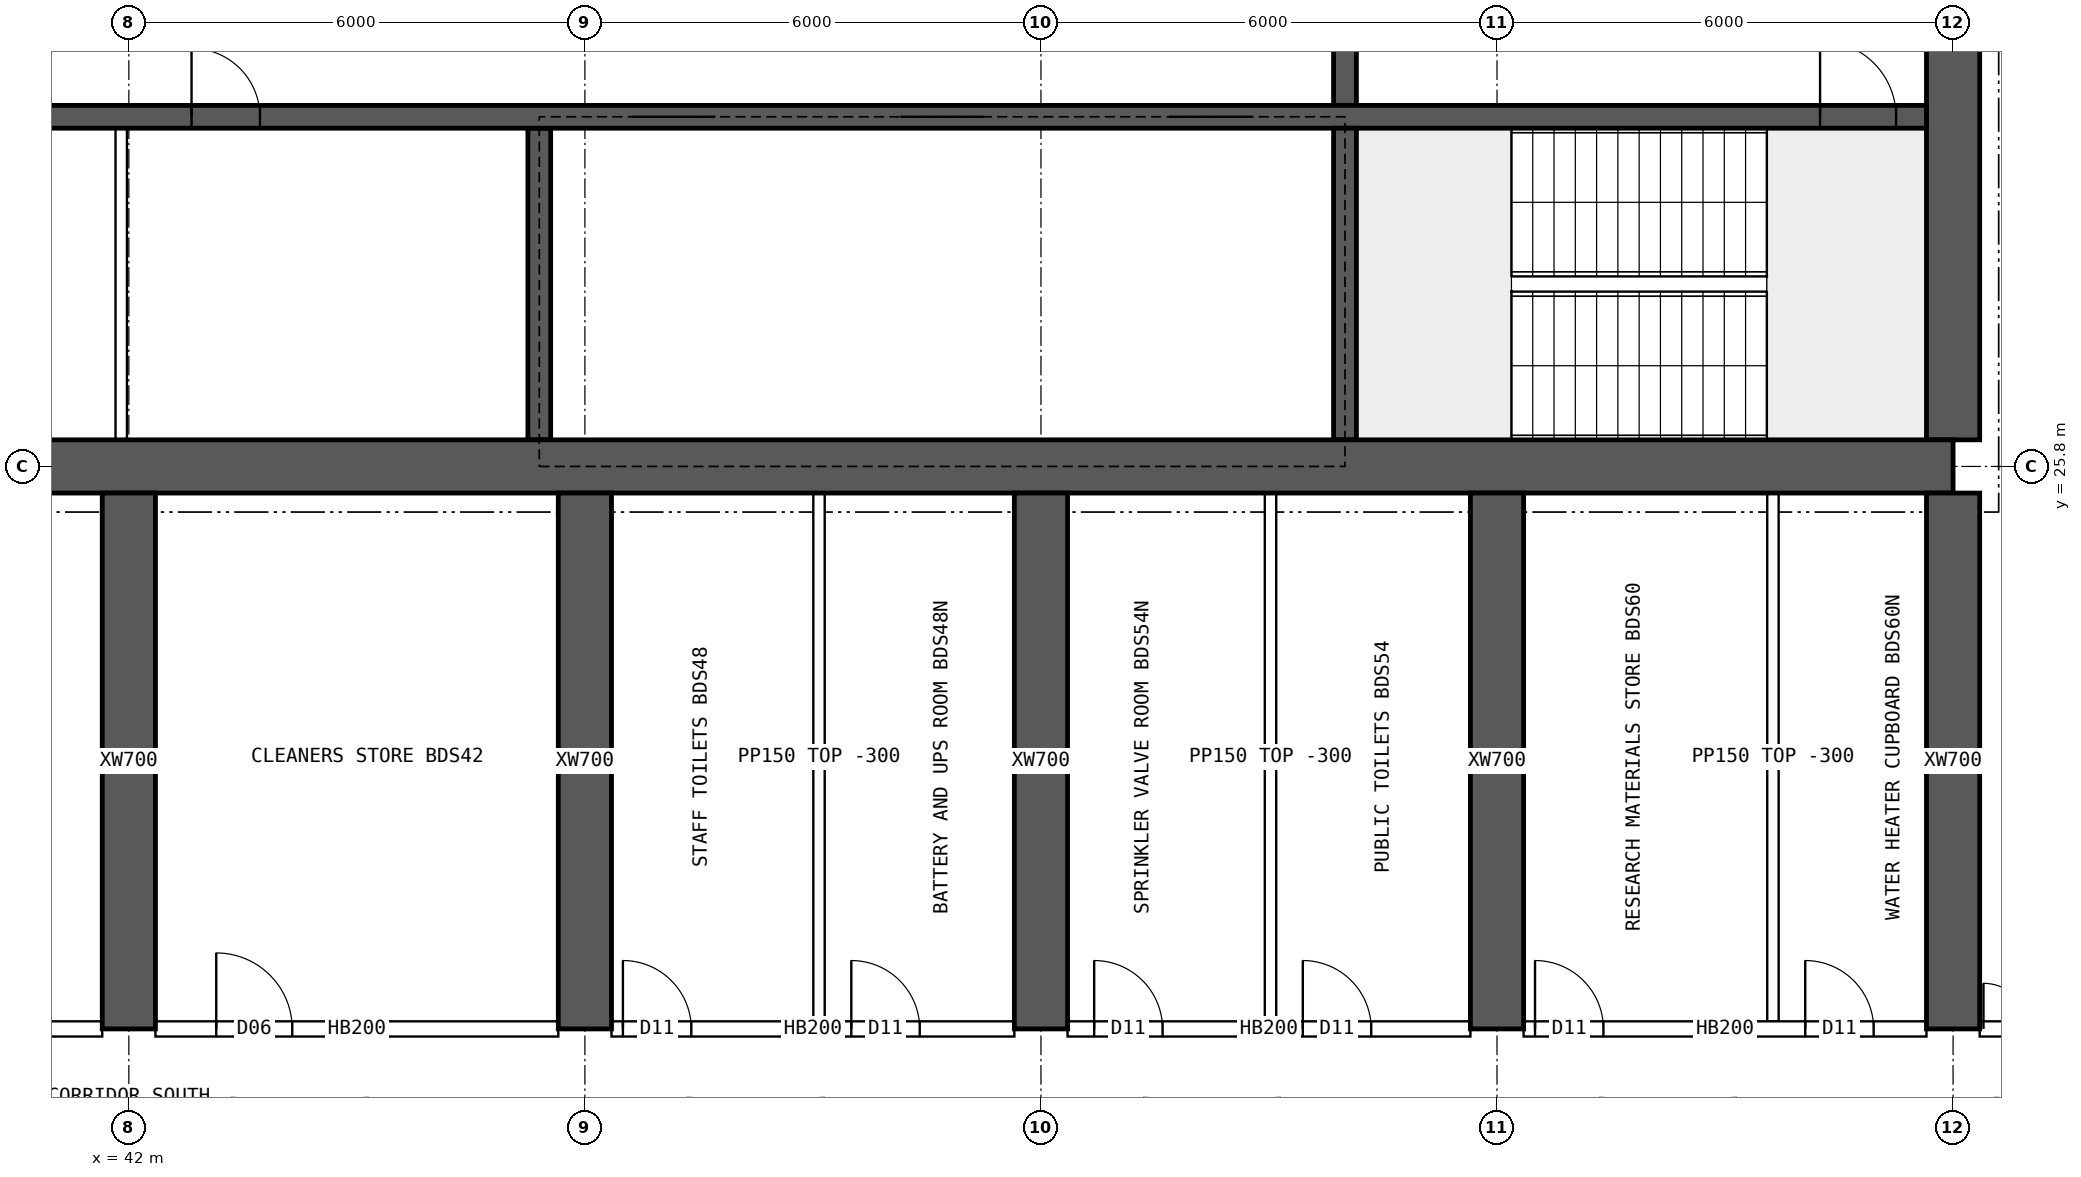
"""IFC4 building model, lengths in metres.
Left out: names, types, materials, properties, quantities, classifications, styles, units other than length and angle.
Written with IfcOpenShell. Run it as: python <this file> out.ifc"""

import sys

from ifc_helpers import new_model, si_unit, direction, frame, frame_2d, origin, place, context, subcontext, project, spatial, rectangle, extrude, element, fill, save


model = new_model("IFC4")
c1 = context("Model", 3, precision=1e-05, world=origin(), true_north=direction((0.0, 1.0)))
c2 = subcontext(c1, "Body", "Model", "MODEL_VIEW")
j1 = project(units=[si_unit("LENGTHUNIT", "METRE"), si_unit("PLANEANGLEUNIT", "RADIAN")], contexts=[c1])
p1 = place(None, origin())
s1 = spatial("IfcSite", under=j1, at=p1, CompositionType="ELEMENT")
p2 = place(p1, origin())
s2 = spatial("IfcBuilding", under=s1, at=p2, CompositionType="ELEMENT")
p3 = place(p2, frame((0.0, 0.0, 257.8)))
s3 = spatial("IfcBuildingStorey", under=s2, at=p3, CompositionType="ELEMENT", Elevation=257.8)
p4 = place(p3, frame((18.0, 25.8, 0.0), z_axis=(0.0, 0.0, 1.0), x_axis=(1.0, 0.0, 0.0)))
e1 = element("IfcWall", 1, at=p4, inside=s3, PredefinedType="SHEAR", context=c2, shape_type="SweptSolid", body=[
    extrude(rectangle(XDim=48.0, YDim=0.7, at=frame_2d((24.0, 0.0))), origin(), (0.0, 0.0, 1.0), 4.5),
])
p5 = place(p3, frame((66.0, 26.15, 0.0), z_axis=(0.0, 0.0, 1.0), x_axis=(0.0, 1.0, 0.0)))
e2 = element("IfcWall", 2, at=p5, inside=s3, PredefinedType="SHEAR", context=c2, shape_type="SweptSolid", body=[
    extrude(rectangle(XDim=11.7, YDim=0.7, at=frame_2d((5.85, 0.0))), origin(), (0.0, 0.0, 1.0), 4.5),
])
p6 = place(p5, frame((5.15, 0.0, 0.0)))
e3 = element("IfcOpeningElement", 3, at=p6, cuts=e2, PredefinedType="OPENING", context=c2, shape_type="SweptSolid", body=[
    extrude(rectangle(XDim=1.2, YDim=2.1, at=frame_2d((0.6, 1.05))), frame((0.0, 0.36, 0.0), z_axis=(0.0, -1.0, 0.0), x_axis=(1.0, 0.0, 0.0)), (0.0, 0.0, 1.0), 0.72),
])
p7 = place(p3, frame((18.35, 30.4, 0.0), z_axis=(0.0, 0.0, 1.0), x_axis=(1.0, 0.0, 0.0)))
e4 = element("IfcWall", 4, at=p7, inside=s3, PredefinedType="SHEAR", context=c2, shape_type="SweptSolid", body=[
    extrude(rectangle(XDim=47.3, YDim=0.3, at=frame_2d((23.65, 0.0))), origin(), (0.0, 0.0, 1.0), 4.5),
])
p8 = place(p7, frame((0.4, 0.0, 0.0)))
e5 = element("IfcOpeningElement", 5, at=p8, cuts=e4, PredefinedType="OPENING", context=c2, shape_type="SweptSolid", body=[
    extrude(rectangle(XDim=1.0, YDim=2.1, at=frame_2d((0.5, 1.05))), frame((0.0, 0.16, 0.0), z_axis=(0.0, -1.0, 0.0), x_axis=(1.0, 0.0, 0.0)), (0.0, 0.0, 1.0), 0.32),
])
p9 = place(p7, frame((45.9, 0.0, 0.0)))
e6 = element("IfcOpeningElement", 6, at=p9, cuts=e4, PredefinedType="OPENING", context=c2, shape_type="SweptSolid", body=[
    extrude(rectangle(XDim=1.0, YDim=2.1, at=frame_2d((0.5, 1.05))), frame((0.0, 0.16, 0.0), z_axis=(0.0, -1.0, 0.0), x_axis=(1.0, 0.0, 0.0)), (0.0, 0.0, 1.0), 0.32),
])
p10 = place(p7, frame((8.4, 0.0, 0.0)))
e7 = element("IfcOpeningElement", 7, at=p10, cuts=e4, PredefinedType="OPENING", context=c2, shape_type="SweptSolid", body=[
    extrude(rectangle(XDim=1.1, YDim=2.1, at=frame_2d((0.55, 1.05))), frame((0.0, 0.16, 0.0), z_axis=(0.0, -1.0, 0.0), x_axis=(1.0, 0.0, 0.0)), (0.0, 0.0, 1.0), 0.32),
])
p11 = place(p7, frame((11.0, 0.0, 0.0)))
e8 = element("IfcOpeningElement", 8, at=p11, cuts=e4, PredefinedType="OPENING", context=c2, shape_type="SweptSolid", body=[
    extrude(rectangle(XDim=1.1, YDim=2.1, at=frame_2d((0.55, 1.05))), frame((0.0, 0.16, 0.0), z_axis=(0.0, -1.0, 0.0), x_axis=(1.0, 0.0, 0.0)), (0.0, 0.0, 1.0), 0.32),
])
p12 = place(p7, frame((13.6, 0.0, 0.0)))
e9 = element("IfcOpeningElement", 9, at=p12, cuts=e4, PredefinedType="OPENING", context=c2, shape_type="SweptSolid", body=[
    extrude(rectangle(XDim=1.1, YDim=2.1, at=frame_2d((0.55, 1.05))), frame((0.0, 0.16, 0.0), z_axis=(0.0, -1.0, 0.0), x_axis=(1.0, 0.0, 0.0)), (0.0, 0.0, 1.0), 0.32),
])
p13 = place(p7, frame((16.2, 0.0, 0.0)))
e10 = element("IfcOpeningElement", 10, at=p13, cuts=e4, PredefinedType="OPENING", context=c2, shape_type="SweptSolid", body=[
    extrude(rectangle(XDim=1.1, YDim=2.1, at=frame_2d((0.55, 1.05))), frame((0.0, 0.16, 0.0), z_axis=(0.0, -1.0, 0.0), x_axis=(1.0, 0.0, 0.0)), (0.0, 0.0, 1.0), 0.32),
])
p14 = place(p7, frame((18.975, 0.0, 0.0)))
e11 = element("IfcOpeningElement", 11, at=p14, cuts=e4, PredefinedType="OPENING", context=c2, shape_type="SweptSolid", body=[
    extrude(rectangle(XDim=0.9, YDim=2.1, at=frame_2d((0.45, 1.05))), frame((0.0, 0.16, 0.0), z_axis=(0.0, -1.0, 0.0), x_axis=(1.0, 0.0, 0.0)), (0.0, 0.0, 1.0), 0.32),
])
p15 = place(p7, frame((24.475, 0.0, 0.0)))
e12 = element("IfcOpeningElement", 12, at=p15, cuts=e4, PredefinedType="OPENING", context=c2, shape_type="SweptSolid", body=[
    extrude(rectangle(XDim=0.9, YDim=2.1, at=frame_2d((0.45, 1.05))), frame((0.0, 0.16, 0.0), z_axis=(0.0, -1.0, 0.0), x_axis=(1.0, 0.0, 0.0)), (0.0, 0.0, 1.0), 0.32),
])
p16 = place(p7, frame((30.267, 0.0, 0.0)))
e13 = element("IfcOpeningElement", 13, at=p16, cuts=e4, PredefinedType="OPENING", context=c2, shape_type="SweptSolid", body=[
    extrude(rectangle(XDim=1.1, YDim=2.1, at=frame_2d((0.55, 1.05))), frame((0.0, 0.16, 0.0), z_axis=(0.0, -1.0, 0.0), x_axis=(1.0, 0.0, 0.0)), (0.0, 0.0, 1.0), 0.32),
])
p17 = place(p7, frame((33.8, 0.0, 0.0)))
e14 = element("IfcOpeningElement", 14, at=p17, cuts=e4, PredefinedType="OPENING", context=c2, shape_type="SweptSolid", body=[
    extrude(rectangle(XDim=1.1, YDim=2.1, at=frame_2d((0.55, 1.05))), frame((0.0, 0.16, 0.0), z_axis=(0.0, -1.0, 0.0), x_axis=(1.0, 0.0, 0.0)), (0.0, 0.0, 1.0), 0.32),
])
p18 = place(p7, frame((37.333, 0.0, 0.0)))
e15 = element("IfcOpeningElement", 15, at=p18, cuts=e4, PredefinedType="OPENING", context=c2, shape_type="SweptSolid", body=[
    extrude(rectangle(XDim=1.1, YDim=2.1, at=frame_2d((0.55, 1.05))), frame((0.0, 0.16, 0.0), z_axis=(0.0, -1.0, 0.0), x_axis=(1.0, 0.0, 0.0)), (0.0, 0.0, 1.0), 0.32),
])
p19 = place(p3, frame((58.0, 26.15, 0.0), z_axis=(0.0, 0.0, 1.0), x_axis=(0.0, 1.0, 0.0)))
e16 = element("IfcWall", 16, at=p19, inside=s3, PredefinedType="SHEAR", context=c2, shape_type="SweptSolid", body=[
    extrude(rectangle(XDim=4.1, YDim=0.3, at=frame_2d((2.05, 0.0))), origin(), (0.0, 0.0, 1.0), 4.5),
])
p20 = place(p3, frame((58.0, 30.55, 0.0), z_axis=(0.0, 0.0, 1.0), x_axis=(0.0, 1.0, 0.0)))
e17 = element("IfcWall", 17, at=p20, inside=s3, PredefinedType="SHEAR", context=c2, shape_type="SweptSolid", body=[
    extrude(rectangle(XDim=3.9, YDim=0.3, at=frame_2d((1.95, 0.0))), origin(), (0.0, 0.0, 1.0), 4.5),
])
p21 = place(p20, frame((1.4, 0.0, 0.0)))
e18 = element("IfcOpeningElement", 18, at=p21, cuts=e17, PredefinedType="OPENING", context=c2, shape_type="SweptSolid", body=[
    extrude(rectangle(XDim=1.2, YDim=2.1, at=frame_2d((0.6, 1.05))), frame((0.0, 0.16, 0.0), z_axis=(0.0, -1.0, 0.0), x_axis=(1.0, 0.0, 0.0)), (0.0, 0.0, 1.0), 0.32),
])
p22 = place(p3, frame((47.4, 26.15, 0.0), z_axis=(0.0, 0.0, 1.0), x_axis=(0.0, 1.0, 0.0)))
e19 = element("IfcWall", 19, at=p22, inside=s3, PredefinedType="SHEAR", context=c2, shape_type="SweptSolid", body=[
    extrude(rectangle(XDim=4.1, YDim=0.3, at=frame_2d((2.05, 0.0))), origin(), (0.0, 0.0, 1.0), 4.5),
])
for number, where, z_axis, x_axis in (
    (20, (42.0, 18.4, 0.0), (0.0, 0.0, 1.0), (0.0, 1.0, 0.0)),
    (21, (48.0, 18.4, 0.0), (0.0, 0.0, 1.0), (0.0, 1.0, 0.0)),
    (22, (54.0, 18.4, 0.0), (0.0, 0.0, 1.0), (0.0, 1.0, 0.0)),
    (23, (60.0, 18.4, 0.0), (0.0, 0.0, 1.0), (0.0, 1.0, 0.0)),
    (24, (66.0, 18.4, 0.0), (0.0, 0.0, 1.0), (0.0, 1.0, 0.0)),
):
    element("IfcWall", number, at=place(p3, frame(where, z_axis=z_axis, x_axis=x_axis)), inside=s3, PredefinedType="SHEAR", context=c2, shape_type="SweptSolid", body=[
        extrude(rectangle(XDim=7.05, YDim=0.7, at=frame_2d((3.525, 0.0))), origin(), (0.0, 0.0, 1.0), 4.5),
    ])
p23 = place(p3, frame((41.9, 26.15, 0.0), z_axis=(0.0, 0.0, 1.0), x_axis=(0.0, 1.0, 0.0)))
e25 = element("IfcWall", 25, at=p23, inside=s3, PredefinedType="SOLIDWALL", context=c2, shape_type="SweptSolid", body=[
    extrude(rectangle(XDim=4.1, YDim=0.15, at=frame_2d((2.05, 0.0))), origin(), (0.0, 0.0, 1.0), 4.2),
])
p24 = place(p3, frame((36.35, 18.4, 0.0), z_axis=(0.0, 0.0, 1.0), x_axis=(1.0, 0.0, 0.0)))
e26 = element("IfcWall", 26, at=p24, inside=s3, PredefinedType="SOLIDWALL", context=c2, shape_type="SweptSolid", body=[
    extrude(rectangle(XDim=5.3, YDim=0.2, at=frame_2d((2.65, 0.0))), origin(), (0.0, 0.0, 1.0), 4.2),
])
p25 = place(p24, frame((0.525, 0.0, 0.0)))
e27 = element("IfcOpeningElement", 27, at=p25, cuts=e26, PredefinedType="OPENING", context=c2, shape_type="SweptSolid", body=[
    extrude(rectangle(XDim=1.0, YDim=2.1, at=frame_2d((0.5, 1.05))), frame((0.0, 0.11, 0.0), z_axis=(0.0, -1.0, 0.0), x_axis=(1.0, 0.0, 0.0)), (0.0, 0.0, 1.0), 0.22),
])
p26 = place(p3, frame((42.35, 18.4, 0.0), z_axis=(0.0, 0.0, 1.0), x_axis=(1.0, 0.0, 0.0)))
e28 = element("IfcWall", 28, at=p26, inside=s3, PredefinedType="SOLIDWALL", context=c2, shape_type="SweptSolid", body=[
    extrude(rectangle(XDim=5.3, YDim=0.2, at=frame_2d((2.65, 0.0))), origin(), (0.0, 0.0, 1.0), 4.2),
])
p27 = place(p26, frame((0.8, 0.0, 0.0)))
e29 = element("IfcOpeningElement", 29, at=p27, cuts=e28, PredefinedType="OPENING", context=c2, shape_type="SweptSolid", body=[
    extrude(rectangle(XDim=1.0, YDim=2.1, at=frame_2d((0.5, 1.05))), frame((0.0, 0.11, 0.0), z_axis=(0.0, -1.0, 0.0), x_axis=(1.0, 0.0, 0.0)), (0.0, 0.0, 1.0), 0.22),
])
p28 = place(p3, frame((48.35, 18.4, 0.0), z_axis=(0.0, 0.0, 1.0), x_axis=(1.0, 0.0, 0.0)))
e30 = element("IfcWall", 30, at=p28, inside=s3, PredefinedType="SOLIDWALL", context=c2, shape_type="SweptSolid", body=[
    extrude(rectangle(XDim=5.3, YDim=0.2, at=frame_2d((2.65, 0.0))), origin(), (0.0, 0.0, 1.0), 4.2),
])
p29 = place(p28, frame((0.15, 0.0, 0.0)))
e31 = element("IfcOpeningElement", 31, at=p29, cuts=e30, PredefinedType="OPENING", context=c2, shape_type="SweptSolid", body=[
    extrude(rectangle(XDim=0.9, YDim=2.1, at=frame_2d((0.45, 1.05))), frame((0.0, 0.11, 0.0), z_axis=(0.0, -1.0, 0.0), x_axis=(1.0, 0.0, 0.0)), (0.0, 0.0, 1.0), 0.22),
])
p30 = place(p28, frame((3.155, 0.0, 0.0)))
e32 = element("IfcOpeningElement", 32, at=p30, cuts=e30, PredefinedType="OPENING", context=c2, shape_type="SweptSolid", body=[
    extrude(rectangle(XDim=0.9, YDim=2.1, at=frame_2d((0.45, 1.05))), frame((0.0, 0.11, 0.0), z_axis=(0.0, -1.0, 0.0), x_axis=(1.0, 0.0, 0.0)), (0.0, 0.0, 1.0), 0.22),
])
p31 = place(p3, frame((54.35, 18.4, 0.0), z_axis=(0.0, 0.0, 1.0), x_axis=(1.0, 0.0, 0.0)))
e33 = element("IfcWall", 33, at=p31, inside=s3, PredefinedType="SOLIDWALL", context=c2, shape_type="SweptSolid", body=[
    extrude(rectangle(XDim=5.3, YDim=0.2, at=frame_2d((2.65, 0.0))), origin(), (0.0, 0.0, 1.0), 4.2),
])
p32 = place(p31, frame((0.35, 0.0, 0.0)))
e34 = element("IfcOpeningElement", 34, at=p32, cuts=e33, PredefinedType="OPENING", context=c2, shape_type="SweptSolid", body=[
    extrude(rectangle(XDim=0.9, YDim=2.1, at=frame_2d((0.45, 1.05))), frame((0.0, 0.11, 0.0), z_axis=(0.0, -1.0, 0.0), x_axis=(1.0, 0.0, 0.0)), (0.0, 0.0, 1.0), 0.22),
])
p33 = place(p31, frame((3.095, 0.0, 0.0)))
e35 = element("IfcOpeningElement", 35, at=p33, cuts=e33, PredefinedType="OPENING", context=c2, shape_type="SweptSolid", body=[
    extrude(rectangle(XDim=0.9, YDim=2.1, at=frame_2d((0.45, 1.05))), frame((0.0, 0.11, 0.0), z_axis=(0.0, -1.0, 0.0), x_axis=(1.0, 0.0, 0.0)), (0.0, 0.0, 1.0), 0.22),
])
p34 = place(p3, frame((60.35, 18.4, 0.0), z_axis=(0.0, 0.0, 1.0), x_axis=(1.0, 0.0, 0.0)))
e36 = element("IfcWall", 36, at=p34, inside=s3, PredefinedType="SOLIDWALL", context=c2, shape_type="SweptSolid", body=[
    extrude(rectangle(XDim=5.3, YDim=0.2, at=frame_2d((2.65, 0.0))), origin(), (0.0, 0.0, 1.0), 4.2),
])
p35 = place(p34, frame((0.15, 0.0, 0.0)))
e37 = element("IfcOpeningElement", 37, at=p35, cuts=e36, PredefinedType="OPENING", context=c2, shape_type="SweptSolid", body=[
    extrude(rectangle(XDim=0.9, YDim=2.1, at=frame_2d((0.45, 1.05))), frame((0.0, 0.11, 0.0), z_axis=(0.0, -1.0, 0.0), x_axis=(1.0, 0.0, 0.0)), (0.0, 0.0, 1.0), 0.22),
])
p36 = place(p34, frame((3.705, 0.0, 0.0)))
e38 = element("IfcOpeningElement", 38, at=p36, cuts=e36, PredefinedType="OPENING", context=c2, shape_type="SweptSolid", body=[
    extrude(rectangle(XDim=0.9, YDim=2.1, at=frame_2d((0.45, 1.05))), frame((0.0, 0.11, 0.0), z_axis=(0.0, -1.0, 0.0), x_axis=(1.0, 0.0, 0.0)), (0.0, 0.0, 1.0), 0.22),
])
p37 = place(p3, frame((66.35, 18.4, 0.0), z_axis=(0.0, 0.0, 1.0), x_axis=(1.0, 0.0, 0.0)))
e39 = element("IfcWall", 39, at=p37, inside=s3, PredefinedType="SOLIDWALL", context=c2, shape_type="SweptSolid", body=[
    extrude(rectangle(XDim=2.05, YDim=0.2, at=frame_2d((1.025, 0.0))), origin(), (0.0, 0.0, 1.0), 4.2),
])
p38 = place(p37, frame((0.05, 0.0, 0.0)))
e40 = element("IfcOpeningElement", 40, at=p38, cuts=e39, PredefinedType="OPENING", context=c2, shape_type="SweptSolid", body=[
    extrude(rectangle(XDim=1.2, YDim=2.1, at=frame_2d((0.6, 1.05))), frame((0.0, 0.11, 0.0), z_axis=(0.0, -1.0, 0.0), x_axis=(1.0, 0.0, 0.0)), (0.0, 0.0, 1.0), 0.22),
])
for number, where, z_axis, x_axis in (
    (41, (51.08, 18.5, 0.0), (0.0, 0.0, 1.0), (0.0, 1.0, 0.0)),
    (42, (57.02, 18.5, 0.0), (0.0, 0.0, 1.0), (0.0, 1.0, 0.0)),
    (43, (63.63, 18.5, 0.0), (0.0, 0.0, 1.0), (0.0, 1.0, 0.0)),
):
    element("IfcWall", number, at=place(p3, frame(where, z_axis=z_axis, x_axis=x_axis)), inside=s3, PredefinedType="PARTITIONING", context=c2, shape_type="SweptSolid", body=[
        extrude(rectangle(XDim=6.95, YDim=0.15, at=frame_2d((3.475, 0.0))), origin(), (0.0, 0.0, 1.0), 4.2),
    ])
p39 = place(p9, origin())
e44 = element("IfcDoor", 44, at=p39, inside=s3, OperationType="SINGLE_SWING_LEFT", PredefinedType="DOOR", context=c2, shape_type="SweptSolid", body=[
    extrude(rectangle(XDim=1.0, YDim=2.1, at=frame_2d((0.5, 1.05))), frame((0.0, 0.025, 0.0), z_axis=(0.0, -1.0, 0.0), x_axis=(1.0, 0.0, 0.0)), (0.0, 0.0, 1.0), 0.05),
])
fill(e6, e44)
p40 = place(p15, origin())
e45 = element("IfcDoor", 45, at=p40, inside=s3, OperationType="SINGLE_SWING_LEFT", PredefinedType="DOOR", context=c2, shape_type="SweptSolid", body=[
    extrude(rectangle(XDim=0.9, YDim=2.1, at=frame_2d((0.45, 1.05))), frame((0.0, 0.025, 0.0), z_axis=(0.0, -1.0, 0.0), x_axis=(1.0, 0.0, 0.0)), (0.0, 0.0, 1.0), 0.05),
])
fill(e12, e45)
p41 = place(p16, origin())
e46 = element("IfcDoor", 46, at=p41, inside=s3, OperationType="DOUBLE_DOOR_SLIDING", PredefinedType="DOOR", context=c2, shape_type="SweptSolid", body=[
    extrude(rectangle(XDim=1.1, YDim=2.1, at=frame_2d((0.55, 1.05))), frame((0.0, 0.025, 0.0), z_axis=(0.0, -1.0, 0.0), x_axis=(1.0, 0.0, 0.0)), (0.0, 0.0, 1.0), 0.05),
])
fill(e13, e46)
p42 = place(p17, origin())
e47 = element("IfcDoor", 47, at=p42, inside=s3, OperationType="DOUBLE_DOOR_SLIDING", PredefinedType="DOOR", context=c2, shape_type="SweptSolid", body=[
    extrude(rectangle(XDim=1.1, YDim=2.1, at=frame_2d((0.55, 1.05))), frame((0.0, 0.025, 0.0), z_axis=(0.0, -1.0, 0.0), x_axis=(1.0, 0.0, 0.0)), (0.0, 0.0, 1.0), 0.05),
])
fill(e14, e47)
p43 = place(p18, origin())
e48 = element("IfcDoor", 48, at=p43, inside=s3, OperationType="DOUBLE_DOOR_SLIDING", PredefinedType="DOOR", context=c2, shape_type="SweptSolid", body=[
    extrude(rectangle(XDim=1.1, YDim=2.1, at=frame_2d((0.55, 1.05))), frame((0.0, 0.025, 0.0), z_axis=(0.0, -1.0, 0.0), x_axis=(1.0, 0.0, 0.0)), (0.0, 0.0, 1.0), 0.05),
])
fill(e15, e48)
p44 = place(p38, origin())
e49 = element("IfcDoor", 49, at=p44, inside=s3, OperationType="DOUBLE_DOOR_SINGLE_SWING", PredefinedType="DOOR", context=c2, shape_type="SweptSolid", body=[
    extrude(rectangle(XDim=1.2, YDim=2.1, at=frame_2d((0.6, 1.05))), frame((0.0, 0.025, 0.0), z_axis=(0.0, -1.0, 0.0), x_axis=(1.0, 0.0, 0.0)), (0.0, 0.0, 1.0), 0.05),
])
fill(e40, e49)
p45 = place(p27, origin())
e50 = element("IfcDoor", 50, at=p45, inside=s3, OperationType="SINGLE_SWING_LEFT", PredefinedType="DOOR", context=c2, shape_type="SweptSolid", body=[
    extrude(rectangle(XDim=1.0, YDim=2.1, at=frame_2d((0.5, 1.05))), frame((0.0, 0.025, 0.0), z_axis=(0.0, -1.0, 0.0), x_axis=(1.0, 0.0, 0.0)), (0.0, 0.0, 1.0), 0.05),
])
fill(e29, e50)
p46 = place(p29, origin())
e51 = element("IfcDoor", 51, at=p46, inside=s3, OperationType="SINGLE_SWING_LEFT", PredefinedType="DOOR", context=c2, shape_type="SweptSolid", body=[
    extrude(rectangle(XDim=0.9, YDim=2.1, at=frame_2d((0.45, 1.05))), frame((0.0, 0.025, 0.0), z_axis=(0.0, -1.0, 0.0), x_axis=(1.0, 0.0, 0.0)), (0.0, 0.0, 1.0), 0.05),
])
fill(e31, e51)
p47 = place(p30, origin())
e52 = element("IfcDoor", 52, at=p47, inside=s3, OperationType="SINGLE_SWING_LEFT", PredefinedType="DOOR", context=c2, shape_type="SweptSolid", body=[
    extrude(rectangle(XDim=0.9, YDim=2.1, at=frame_2d((0.45, 1.05))), frame((0.0, 0.025, 0.0), z_axis=(0.0, -1.0, 0.0), x_axis=(1.0, 0.0, 0.0)), (0.0, 0.0, 1.0), 0.05),
])
fill(e32, e52)
p48 = place(p32, origin())
e53 = element("IfcDoor", 53, at=p48, inside=s3, OperationType="SINGLE_SWING_LEFT", PredefinedType="DOOR", context=c2, shape_type="SweptSolid", body=[
    extrude(rectangle(XDim=0.9, YDim=2.1, at=frame_2d((0.45, 1.05))), frame((0.0, 0.025, 0.0), z_axis=(0.0, -1.0, 0.0), x_axis=(1.0, 0.0, 0.0)), (0.0, 0.0, 1.0), 0.05),
])
fill(e34, e53)
p49 = place(p33, origin())
e54 = element("IfcDoor", 54, at=p49, inside=s3, OperationType="SINGLE_SWING_LEFT", PredefinedType="DOOR", context=c2, shape_type="SweptSolid", body=[
    extrude(rectangle(XDim=0.9, YDim=2.1, at=frame_2d((0.45, 1.05))), frame((0.0, 0.025, 0.0), z_axis=(0.0, -1.0, 0.0), x_axis=(1.0, 0.0, 0.0)), (0.0, 0.0, 1.0), 0.05),
])
fill(e35, e54)
p50 = place(p35, origin())
e55 = element("IfcDoor", 55, at=p50, inside=s3, OperationType="SINGLE_SWING_LEFT", PredefinedType="DOOR", context=c2, shape_type="SweptSolid", body=[
    extrude(rectangle(XDim=0.9, YDim=2.1, at=frame_2d((0.45, 1.05))), frame((0.0, 0.025, 0.0), z_axis=(0.0, -1.0, 0.0), x_axis=(1.0, 0.0, 0.0)), (0.0, 0.0, 1.0), 0.05),
])
fill(e37, e55)
p51 = place(p36, origin())
e56 = element("IfcDoor", 56, at=p51, inside=s3, OperationType="SINGLE_SWING_LEFT", PredefinedType="DOOR", context=c2, shape_type="SweptSolid", body=[
    extrude(rectangle(XDim=0.9, YDim=2.1, at=frame_2d((0.45, 1.05))), frame((0.0, 0.025, 0.0), z_axis=(0.0, -1.0, 0.0), x_axis=(1.0, 0.0, 0.0)), (0.0, 0.0, 1.0), 0.05),
])
fill(e38, e56)
save(model, sys.argv[1])
